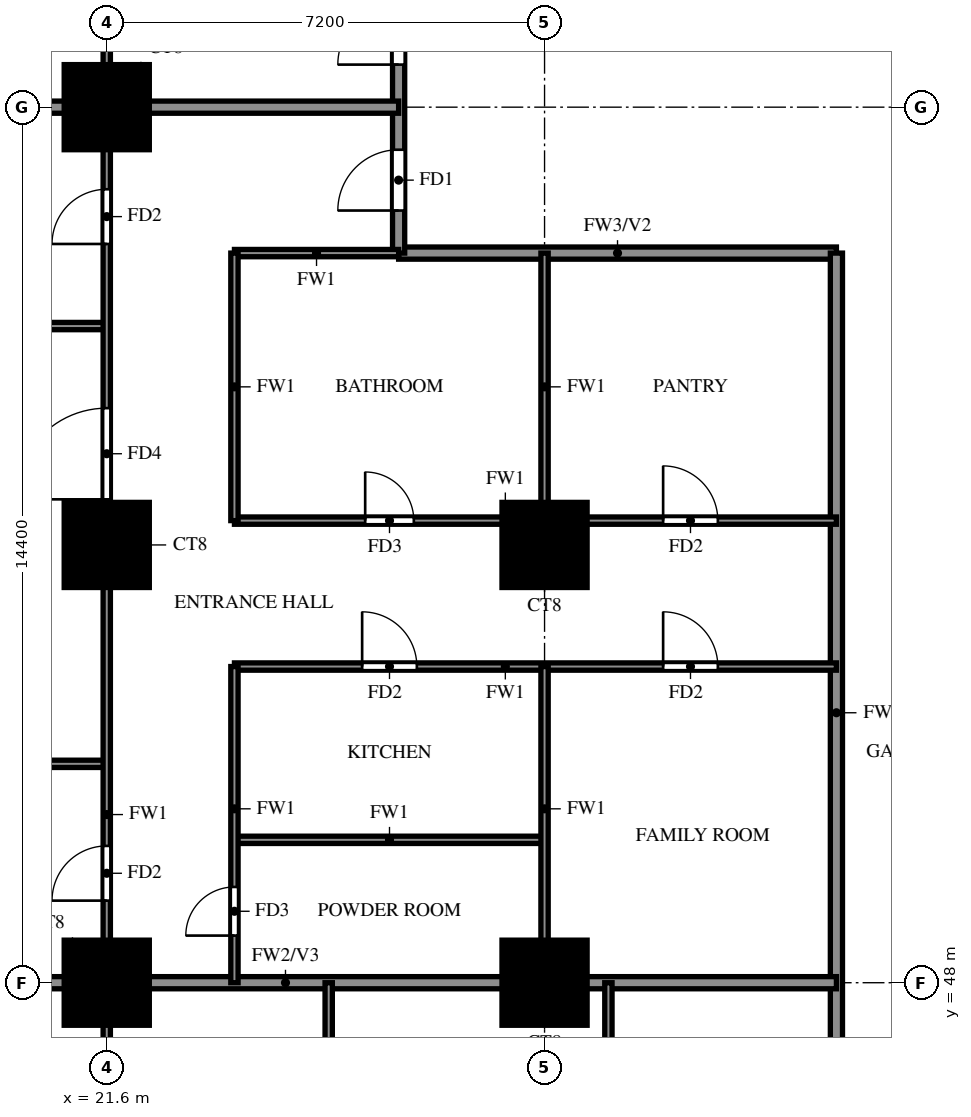
"""IFC4 building model, lengths in metres.
Left out: names, types, materials, properties, quantities, classifications, styles, units other than length and angle.
Written with IfcOpenShell. Run it as: python <this file> out.ifc"""

import sys

from ifc_helpers import new_model, si_unit, direction, frame, frame_2d, origin, origin_2d, place, context, subcontext, project, spatial, rectangle, extrude, source, transform, mapped, element, fill, save


model = new_model("IFC4")
c1 = context("Model", 3, precision=1e-05, world=origin(), true_north=direction((0.0, 1.0)))
c2 = subcontext(c1, "Body", "Model", "MODEL_VIEW")
j1 = project(units=[si_unit("LENGTHUNIT", "METRE"), si_unit("PLANEANGLEUNIT", "RADIAN")], contexts=[c1])
p1 = place(None, origin())
s1 = spatial("IfcSite", under=j1, at=p1, CompositionType="ELEMENT")
p2 = place(p1, origin())
s2 = spatial("IfcBuilding", under=s1, at=p2, CompositionType="ELEMENT")
p3 = place(p2, frame((0.0, 0.0, 37.5)))
s3 = spatial("IfcBuildingStorey", under=s2, at=p3, CompositionType="ELEMENT", Elevation=37.5)
m1 = source(origin(), c2, "Body", "SweptSolid", [
    extrude(rectangle(XDim=1.4, YDim=1.4, at=origin_2d()), origin(), (0.0, 0.0, 1.0), 3.18),
])
for number, where, z_axis, x_axis in (
    (1, (21.6, 48.0, 0.0), (0.0, 0.0, 1.0), (1.0, 0.0, 0.0)),
    (2, (28.8, 48.0, 0.0), (0.0, 0.0, 1.0), (1.0, 0.0, 0.0)),
    (3, (21.6, 55.2, 0.0), (0.0, 0.0, 1.0), (1.0, 0.0, 0.0)),
    (4, (28.8, 55.2, 0.0), (0.0, 0.0, 1.0), (1.0, 0.0, 0.0)),
    (5, (21.6, 62.4, 0.0), (0.0, 0.0, 1.0), (1.0, 0.0, 0.0)),
):
    element("IfcColumn", number, at=place(p3, frame(where, z_axis=z_axis, x_axis=x_axis)), inside=s3, PredefinedType="COLUMN", context=c2, shape_type="MappedRepresentation", body=[
        mapped(m1, transform((0.0, 0.0, 0.0))),
    ])
p4 = place(p3, frame((26.4, 60.0, 0.0), z_axis=(0.0, 0.0, 1.0), x_axis=(1.0, 0.0, 0.0)))
e6 = element("IfcWall", 6, at=p4, inside=s3, PredefinedType="SOLIDWALL", context=c2, shape_type="SweptSolid", body=[
    extrude(rectangle(XDim=7.2, YDim=0.2, at=frame_2d((3.6, 0.0))), origin(), (0.0, 0.0, 1.0), 3.18),
])
p5 = place(p3, frame((26.4, 60.0, 0.0), z_axis=(0.0, 0.0, 1.0), x_axis=(0.0, 1.0, 0.0)))
e7 = element("IfcWall", 7, at=p5, inside=s3, PredefinedType="SOLIDWALL", context=c2, shape_type="SweptSolid", body=[
    extrude(rectangle(XDim=9.6, YDim=0.2, at=frame_2d((4.8, 0.0))), origin(), (0.0, 0.0, 1.0), 3.18),
])
p6 = place(p5, frame((0.7, 0.0, 0.0)))
e8 = element("IfcOpeningElement", 8, at=p6, cuts=e7, PredefinedType="OPENING", context=c2, shape_type="SweptSolid", body=[
    extrude(rectangle(XDim=1.0, YDim=2.1, at=frame_2d((0.5, 1.05))), frame((0.0, 0.11, 0.0), z_axis=(0.0, -1.0, 0.0), x_axis=(1.0, 0.0, 0.0)), (0.0, 0.0, 1.0), 0.22),
])
p7 = place(p5, frame((3.1, 0.0, 0.0)))
e9 = element("IfcOpeningElement", 9, at=p7, cuts=e7, PredefinedType="OPENING", context=c2, shape_type="SweptSolid", body=[
    extrude(rectangle(XDim=1.0, YDim=2.1, at=frame_2d((0.5, 1.05))), frame((0.0, 0.11, 0.0), z_axis=(0.0, -1.0, 0.0), x_axis=(1.0, 0.0, 0.0)), (0.0, 0.0, 1.0), 0.22),
])
p8 = place(p3, frame((33.6, 45.6, 0.0), z_axis=(0.0, 0.0, 1.0), x_axis=(0.0, 1.0, 0.0)))
e10 = element("IfcWall", 10, at=p8, inside=s3, PredefinedType="SOLIDWALL", context=c2, shape_type="SweptSolid", body=[
    extrude(rectangle(XDim=14.4, YDim=0.2, at=frame_2d((7.2, 0.0))), origin(), (0.0, 0.0, 1.0), 3.18),
])
p9 = place(p3, frame((14.525, 48.0, 0.0), z_axis=(0.0, 0.0, 1.0), x_axis=(1.0, 0.0, 0.0)))
e11 = element("IfcWall", 11, at=p9, inside=s3, PredefinedType="SOLIDWALL", context=c2, shape_type="SweptSolid", body=[
    extrude(rectangle(XDim=19.075, YDim=0.2, at=frame_2d((9.538, 0.0))), origin(), (0.0, 0.0, 1.0), 3.18),
])
p10 = place(p3, frame((14.525, 62.4, 0.0), z_axis=(0.0, 0.0, 1.0), x_axis=(1.0, 0.0, 0.0)))
e12 = element("IfcWall", 12, at=p10, inside=s3, PredefinedType="SOLIDWALL", context=c2, shape_type="SweptSolid", body=[
    extrude(rectangle(XDim=11.875, YDim=0.2, at=frame_2d((5.938, 0.0))), origin(), (0.0, 0.0, 1.0), 3.18),
])
p11 = place(p3, frame((23.7, 50.35, 0.0), z_axis=(0.0, 0.0, 1.0), x_axis=(1.0, 0.0, 0.0)))
e13 = element("IfcWall", 13, at=p11, inside=s3, PredefinedType="PARTITIONING", context=c2, shape_type="SweptSolid", body=[
    extrude(rectangle(XDim=5.1, YDim=0.12, at=frame_2d((2.55, 0.0))), origin(), (0.0, 0.0, 1.0), 3.18),
])
p12 = place(p3, frame((14.525, 51.6, 0.0), z_axis=(0.0, 0.0, 1.0), x_axis=(1.0, 0.0, 0.0)))
e14 = element("IfcWall", 14, at=p12, inside=s3, PredefinedType="PARTITIONING", context=c2, shape_type="SweptSolid", body=[
    extrude(rectangle(XDim=7.075, YDim=0.12, at=frame_2d((3.538, 0.0))), origin(), (0.0, 0.0, 1.0), 2.28),
])
p13 = place(p3, frame((23.7, 53.2, 0.0), z_axis=(0.0, 0.0, 1.0), x_axis=(1.0, 0.0, 0.0)))
e15 = element("IfcWall", 15, at=p13, inside=s3, PredefinedType="PARTITIONING", context=c2, shape_type="SweptSolid", body=[
    extrude(rectangle(XDim=9.9, YDim=0.12, at=frame_2d((4.95, 0.0))), origin(), (0.0, 0.0, 1.0), 3.18),
])
p14 = place(p13, frame((2.1, 0.0, 0.0)))
e16 = element("IfcOpeningElement", 16, at=p14, cuts=e15, PredefinedType="OPENING", context=c2, shape_type="SweptSolid", body=[
    extrude(rectangle(XDim=0.9, YDim=2.1, at=frame_2d((0.45, 1.05))), frame((0.0, 0.07, 0.0), z_axis=(0.0, -1.0, 0.0), x_axis=(1.0, 0.0, 0.0)), (0.0, 0.0, 1.0), 0.14),
])
p15 = place(p13, frame((7.05, 0.0, 0.0)))
e17 = element("IfcOpeningElement", 17, at=p15, cuts=e15, PredefinedType="OPENING", context=c2, shape_type="SweptSolid", body=[
    extrude(rectangle(XDim=0.9, YDim=2.1, at=frame_2d((0.45, 1.05))), frame((0.0, 0.07, 0.0), z_axis=(0.0, -1.0, 0.0), x_axis=(1.0, 0.0, 0.0)), (0.0, 0.0, 1.0), 0.14),
])
p16 = place(p3, frame((23.7, 55.6, 0.0), z_axis=(0.0, 0.0, 1.0), x_axis=(1.0, 0.0, 0.0)))
e18 = element("IfcWall", 18, at=p16, inside=s3, PredefinedType="PARTITIONING", context=c2, shape_type="SweptSolid", body=[
    extrude(rectangle(XDim=9.9, YDim=0.12, at=frame_2d((4.95, 0.0))), origin(), (0.0, 0.0, 1.0), 3.18),
])
p17 = place(p16, frame((2.15, 0.0, 0.0)))
e19 = element("IfcOpeningElement", 19, at=p17, cuts=e18, PredefinedType="OPENING", context=c2, shape_type="SweptSolid", body=[
    extrude(rectangle(XDim=0.8, YDim=2.1, at=frame_2d((0.4, 1.05))), frame((0.0, 0.07, 0.0), z_axis=(0.0, -1.0, 0.0), x_axis=(1.0, 0.0, 0.0)), (0.0, 0.0, 1.0), 0.14),
])
p18 = place(p16, frame((7.05, 0.0, 0.0)))
e20 = element("IfcOpeningElement", 20, at=p18, cuts=e18, PredefinedType="OPENING", context=c2, shape_type="SweptSolid", body=[
    extrude(rectangle(XDim=0.9, YDim=2.1, at=frame_2d((0.45, 1.05))), frame((0.0, 0.07, 0.0), z_axis=(0.0, -1.0, 0.0), x_axis=(1.0, 0.0, 0.0)), (0.0, 0.0, 1.0), 0.14),
])
p19 = place(p3, frame((14.525, 58.8, 0.0), z_axis=(0.0, 0.0, 1.0), x_axis=(1.0, 0.0, 0.0)))
e21 = element("IfcWall", 21, at=p19, inside=s3, PredefinedType="PARTITIONING", context=c2, shape_type="SweptSolid", body=[
    extrude(rectangle(XDim=7.075, YDim=0.12, at=frame_2d((3.538, 0.0))), origin(), (0.0, 0.0, 1.0), 2.28),
])
p20 = place(p3, frame((23.7, 60.0, 0.0), z_axis=(0.0, 0.0, 1.0), x_axis=(1.0, 0.0, 0.0)))
e22 = element("IfcWall", 22, at=p20, inside=s3, PredefinedType="PARTITIONING", context=c2, shape_type="SweptSolid", body=[
    extrude(rectangle(XDim=2.7, YDim=0.12, at=frame_2d((1.35, 0.0))), origin(), (0.0, 0.0, 1.0), 3.18),
])
p21 = place(p3, frame((21.6, 33.725, 0.0), z_axis=(0.0, 0.0, 1.0), x_axis=(0.0, 1.0, 0.0)))
e23 = element("IfcWall", 23, at=p21, inside=s3, PredefinedType="PARTITIONING", context=c2, shape_type="SweptSolid", body=[
    extrude(rectangle(XDim=35.875, YDim=0.12, at=frame_2d((17.938, 0.0))), origin(), (0.0, 0.0, 1.0), 3.18),
])
p22 = place(p21, frame((7.775, 0.0, 0.0)))
e24 = element("IfcOpeningElement", 24, at=p22, cuts=e23, PredefinedType="OPENING", context=c2, shape_type="SweptSolid", body=[
    extrude(rectangle(XDim=0.9, YDim=2.1, at=frame_2d((0.45, 1.05))), frame((0.0, 0.07, 0.0), z_axis=(0.0, -1.0, 0.0), x_axis=(1.0, 0.0, 0.0)), (0.0, 0.0, 1.0), 0.14),
])
p23 = place(p21, frame((15.625, 0.0, 0.0)))
e25 = element("IfcOpeningElement", 25, at=p23, cuts=e23, PredefinedType="OPENING", context=c2, shape_type="SweptSolid", body=[
    extrude(rectangle(XDim=0.9, YDim=2.1, at=frame_2d((0.45, 1.05))), frame((0.0, 0.07, 0.0), z_axis=(0.0, -1.0, 0.0), x_axis=(1.0, 0.0, 0.0)), (0.0, 0.0, 1.0), 0.14),
])
p24 = place(p21, frame((22.225, 0.0, 0.0)))
e26 = element("IfcOpeningElement", 26, at=p24, cuts=e23, PredefinedType="OPENING", context=c2, shape_type="SweptSolid", body=[
    extrude(rectangle(XDim=1.5, YDim=2.1, at=frame_2d((0.75, 1.05))), frame((0.0, 0.07, 0.0), z_axis=(0.0, -1.0, 0.0), x_axis=(1.0, 0.0, 0.0)), (0.0, 0.0, 1.0), 0.14),
])
p25 = place(p21, frame((26.425, 0.0, 0.0)))
e27 = element("IfcOpeningElement", 27, at=p25, cuts=e23, PredefinedType="OPENING", context=c2, shape_type="SweptSolid", body=[
    extrude(rectangle(XDim=0.9, YDim=2.1, at=frame_2d((0.45, 1.05))), frame((0.0, 0.07, 0.0), z_axis=(0.0, -1.0, 0.0), x_axis=(1.0, 0.0, 0.0)), (0.0, 0.0, 1.0), 0.14),
])
p26 = place(p21, frame((30.025, 0.0, 0.0)))
e28 = element("IfcOpeningElement", 28, at=p26, cuts=e23, PredefinedType="OPENING", context=c2, shape_type="SweptSolid", body=[
    extrude(rectangle(XDim=0.9, YDim=2.1, at=frame_2d((0.45, 1.05))), frame((0.0, 0.07, 0.0), z_axis=(0.0, -1.0, 0.0), x_axis=(1.0, 0.0, 0.0)), (0.0, 0.0, 1.0), 0.14),
])
p27 = place(p21, frame((33.625, 0.0, 0.0)))
e29 = element("IfcOpeningElement", 29, at=p27, cuts=e23, PredefinedType="OPENING", context=c2, shape_type="SweptSolid", body=[
    extrude(rectangle(XDim=0.9, YDim=2.1, at=frame_2d((0.45, 1.05))), frame((0.0, 0.07, 0.0), z_axis=(0.0, -1.0, 0.0), x_axis=(1.0, 0.0, 0.0)), (0.0, 0.0, 1.0), 0.14),
])
p28 = place(p3, frame((23.7, 48.0, 0.0), z_axis=(0.0, 0.0, 1.0), x_axis=(0.0, 1.0, 0.0)))
e30 = element("IfcWall", 30, at=p28, inside=s3, PredefinedType="PARTITIONING", context=c2, shape_type="SweptSolid", body=[
    extrude(rectangle(XDim=5.2, YDim=0.12, at=frame_2d((2.6, 0.0))), origin(), (0.0, 0.0, 1.0), 3.18),
])
p29 = place(p28, frame((0.775, 0.0, 0.0)))
e31 = element("IfcOpeningElement", 31, at=p29, cuts=e30, PredefinedType="OPENING", context=c2, shape_type="SweptSolid", body=[
    extrude(rectangle(XDim=0.8, YDim=2.1, at=frame_2d((0.4, 1.05))), frame((0.0, 0.07, 0.0), z_axis=(0.0, -1.0, 0.0), x_axis=(1.0, 0.0, 0.0)), (0.0, 0.0, 1.0), 0.14),
])
p30 = place(p3, frame((23.7, 55.6, 0.0), z_axis=(0.0, 0.0, 1.0), x_axis=(0.0, 1.0, 0.0)))
e32 = element("IfcWall", 32, at=p30, inside=s3, PredefinedType="PARTITIONING", context=c2, shape_type="SweptSolid", body=[
    extrude(rectangle(XDim=4.4, YDim=0.12, at=frame_2d((2.2, 0.0))), origin(), (0.0, 0.0, 1.0), 3.18),
])
p31 = place(p3, frame((25.25, 42.9, 0.0), z_axis=(0.0, 0.0, 1.0), x_axis=(0.0, 1.0, 0.0)))
e33 = element("IfcWall", 33, at=p31, inside=s3, PredefinedType="PARTITIONING", context=c2, shape_type="SweptSolid", body=[
    extrude(rectangle(XDim=5.1, YDim=0.12, at=frame_2d((2.55, 0.0))), origin(), (0.0, 0.0, 1.0), 3.18),
])
p32 = place(p3, frame((28.8, 48.0, 0.0), z_axis=(0.0, 0.0, 1.0), x_axis=(0.0, 1.0, 0.0)))
e34 = element("IfcWall", 34, at=p32, inside=s3, PredefinedType="PARTITIONING", context=c2, shape_type="SweptSolid", body=[
    extrude(rectangle(XDim=5.2, YDim=0.12, at=frame_2d((2.6, 0.0))), origin(), (0.0, 0.0, 1.0), 3.18),
])
p33 = place(p3, frame((28.8, 55.6, 0.0), z_axis=(0.0, 0.0, 1.0), x_axis=(0.0, 1.0, 0.0)))
e35 = element("IfcWall", 35, at=p33, inside=s3, PredefinedType="PARTITIONING", context=c2, shape_type="SweptSolid", body=[
    extrude(rectangle(XDim=4.4, YDim=0.12, at=frame_2d((2.2, 0.0))), origin(), (0.0, 0.0, 1.0), 3.18),
])
p34 = place(p3, frame((29.85, 42.9, 0.0), z_axis=(0.0, 0.0, 1.0), x_axis=(0.0, 1.0, 0.0)))
e36 = element("IfcWall", 36, at=p34, inside=s3, PredefinedType="PARTITIONING", context=c2, shape_type="SweptSolid", body=[
    extrude(rectangle(XDim=5.1, YDim=0.12, at=frame_2d((2.55, 0.0))), origin(), (0.0, 0.0, 1.0), 3.18),
])
p35 = place(p6, origin())
e37 = element("IfcDoor", 37, at=p35, inside=s3, OperationType="SINGLE_SWING_LEFT", PredefinedType="DOOR", context=c2, shape_type="SweptSolid", body=[
    extrude(rectangle(XDim=1.0, YDim=2.1, at=frame_2d((0.5, 1.05))), frame((0.0, 0.025, 0.0), z_axis=(0.0, -1.0, 0.0), x_axis=(1.0, 0.0, 0.0)), (0.0, 0.0, 1.0), 0.05),
])
fill(e8, e37)
p36 = place(p23, origin())
e38 = element("IfcDoor", 38, at=p36, inside=s3, OperationType="SINGLE_SWING_LEFT", PredefinedType="DOOR", context=c2, shape_type="SweptSolid", body=[
    extrude(rectangle(XDim=0.9, YDim=2.1, at=frame_2d((0.45, 1.05))), frame((0.0, 0.025, 0.0), z_axis=(0.0, -1.0, 0.0), x_axis=(1.0, 0.0, 0.0)), (0.0, 0.0, 1.0), 0.05),
])
fill(e25, e38)
p37 = place(p24, origin())
e39 = element("IfcDoor", 39, at=p37, inside=s3, OperationType="SINGLE_SWING_LEFT", PredefinedType="DOOR", context=c2, shape_type="SweptSolid", body=[
    extrude(rectangle(XDim=1.5, YDim=2.1, at=frame_2d((0.75, 1.05))), frame((0.0, 0.025, 0.0), z_axis=(0.0, -1.0, 0.0), x_axis=(1.0, 0.0, 0.0)), (0.0, 0.0, 1.0), 0.05),
])
fill(e26, e39)
p38 = place(p25, origin())
e40 = element("IfcDoor", 40, at=p38, inside=s3, OperationType="SINGLE_SWING_LEFT", PredefinedType="DOOR", context=c2, shape_type="SweptSolid", body=[
    extrude(rectangle(XDim=0.9, YDim=2.1, at=frame_2d((0.45, 1.05))), frame((0.0, 0.025, 0.0), z_axis=(0.0, -1.0, 0.0), x_axis=(1.0, 0.0, 0.0)), (0.0, 0.0, 1.0), 0.05),
])
fill(e27, e40)
p39 = place(p29, origin())
e41 = element("IfcDoor", 41, at=p39, inside=s3, OperationType="SINGLE_SWING_LEFT", PredefinedType="DOOR", context=c2, shape_type="SweptSolid", body=[
    extrude(rectangle(XDim=0.8, YDim=2.1, at=frame_2d((0.4, 1.05))), frame((0.0, 0.025, 0.0), z_axis=(0.0, -1.0, 0.0), x_axis=(1.0, 0.0, 0.0)), (0.0, 0.0, 1.0), 0.05),
])
fill(e31, e41)
p40 = place(p14, origin())
e42 = element("IfcDoor", 42, at=p40, inside=s3, OperationType="SINGLE_SWING_RIGHT", PredefinedType="DOOR", context=c2, shape_type="SweptSolid", body=[
    extrude(rectangle(XDim=0.9, YDim=2.1, at=frame_2d((0.45, 1.05))), frame((0.0, 0.025, 0.0), z_axis=(0.0, -1.0, 0.0), x_axis=(1.0, 0.0, 0.0)), (0.0, 0.0, 1.0), 0.05),
])
fill(e16, e42)
p41 = place(p17, origin())
e43 = element("IfcDoor", 43, at=p41, inside=s3, OperationType="SINGLE_SWING_LEFT", PredefinedType="DOOR", context=c2, shape_type="SweptSolid", body=[
    extrude(rectangle(XDim=0.8, YDim=2.1, at=frame_2d((0.4, 1.05))), frame((0.0, 0.025, 0.0), z_axis=(0.0, -1.0, 0.0), x_axis=(1.0, 0.0, 0.0)), (0.0, 0.0, 1.0), 0.05),
])
fill(e19, e43)
p42 = place(p15, origin())
e44 = element("IfcDoor", 44, at=p42, inside=s3, OperationType="SINGLE_SWING_LEFT", PredefinedType="DOOR", context=c2, shape_type="SweptSolid", body=[
    extrude(rectangle(XDim=0.9, YDim=2.1, at=frame_2d((0.45, 1.05))), frame((0.0, 0.025, 0.0), z_axis=(0.0, -1.0, 0.0), x_axis=(1.0, 0.0, 0.0)), (0.0, 0.0, 1.0), 0.05),
])
fill(e17, e44)
p43 = place(p18, origin())
e45 = element("IfcDoor", 45, at=p43, inside=s3, OperationType="SINGLE_SWING_RIGHT", PredefinedType="DOOR", context=c2, shape_type="SweptSolid", body=[
    extrude(rectangle(XDim=0.9, YDim=2.1, at=frame_2d((0.45, 1.05))), frame((0.0, 0.025, 0.0), z_axis=(0.0, -1.0, 0.0), x_axis=(1.0, 0.0, 0.0)), (0.0, 0.0, 1.0), 0.05),
])
fill(e20, e45)
p44 = place(p7, origin())
e46 = element("IfcDoor", 46, at=p44, inside=s3, OperationType="SINGLE_SWING_LEFT", PredefinedType="DOOR", context=c2, shape_type="SweptSolid", body=[
    extrude(rectangle(XDim=1.0, YDim=2.1, at=frame_2d((0.5, 1.05))), frame((0.0, 0.025, 0.0), z_axis=(0.0, -1.0, 0.0), x_axis=(1.0, 0.0, 0.0)), (0.0, 0.0, 1.0), 0.05),
])
fill(e9, e46)
save(model, sys.argv[1])
